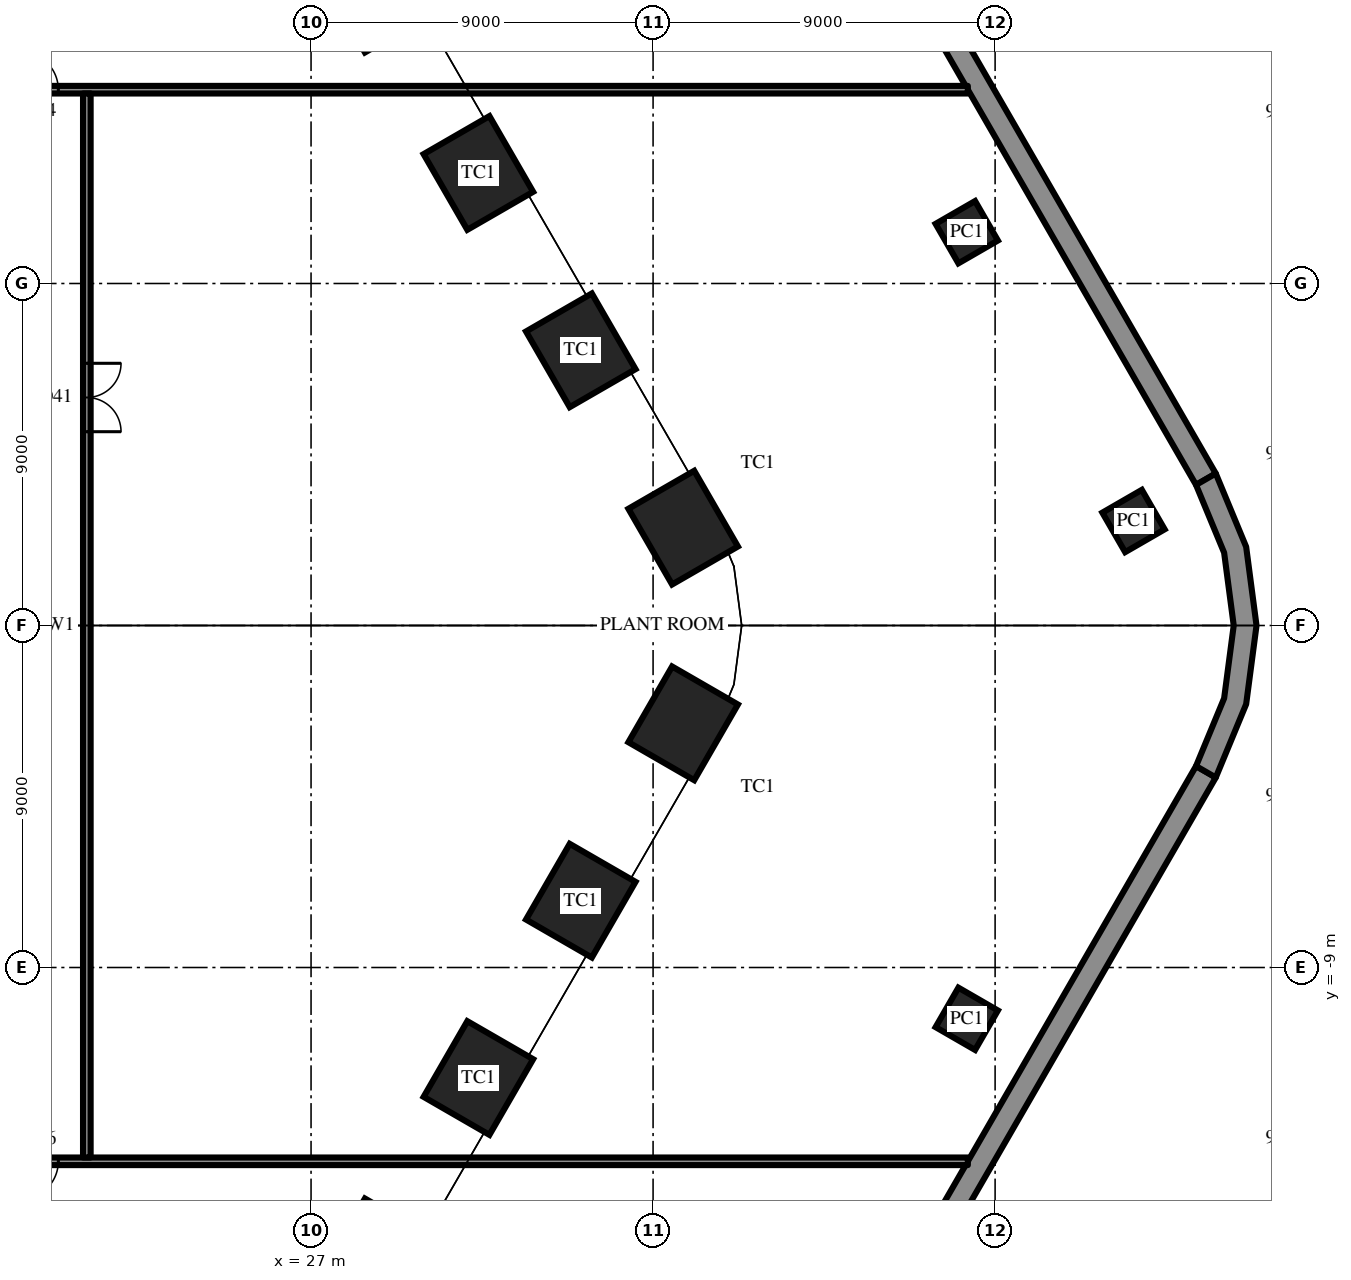
"""IFC4 building model, lengths in metres.
Left out: names, types, materials, properties, quantities, classifications, styles, units other than length and angle.
Written with IfcOpenShell. Run it as: python <this file> out.ifc"""

import sys

from ifc_helpers import new_model, si_unit, direction, frame, frame_2d, origin, origin_2d, place, context, subcontext, project, spatial, polyline, rectangle, outline, extrude, element, fill, save


model = new_model("IFC4")
c1 = context("Model", 3, precision=1e-05, world=origin(), true_north=direction((0.0, 1.0)))
c2 = subcontext(c1, "Body", "Model", "MODEL_VIEW")
j1 = project(units=[si_unit("LENGTHUNIT", "METRE"), si_unit("PLANEANGLEUNIT", "RADIAN")], contexts=[c1])
p1 = place(None, origin())
s1 = spatial("IfcSite", under=j1, at=p1, CompositionType="ELEMENT")
p2 = place(p1, origin())
s2 = spatial("IfcBuilding", under=s1, at=p2, CompositionType="ELEMENT")
p3 = place(p2, frame((0.0, 0.0, -4.5)))
s3 = spatial("IfcBuildingStorey", under=s2, at=p3, CompositionType="ELEMENT", Elevation=-4.5)
for number, where, z_axis, x_axis in (
    (1, (36.792, 2.575, 0.0), (0.0, 0.0, 1.0), (-0.5, 0.866, 0.0)),
    (2, (34.097, 7.242, 0.0), (0.0, 0.0, 1.0), (-0.5, 0.866, 0.0)),
    (3, (31.403, 11.908, 0.0), (0.0, 0.0, 1.0), (-0.5, 0.866, 0.0)),
    (4, (28.709, 16.575, 0.0), (0.0, 0.0, 1.0), (-0.5, 0.866, 0.0)),
    (5, (28.709, -16.575, 0.0), (0.0, 0.0, 1.0), (0.5, 0.866, 0.0)),
    (6, (31.403, -11.908, 0.0), (0.0, 0.0, 1.0), (0.5, 0.866, 0.0)),
    (7, (34.097, -7.242, 0.0), (0.0, 0.0, 1.0), (0.5, 0.866, 0.0)),
    (8, (36.792, -2.575, 0.0), (0.0, 0.0, 1.0), (0.5, 0.866, 0.0)),
):
    element("IfcColumn", number, at=place(p3, frame(where, z_axis=z_axis, x_axis=x_axis)), inside=s3, PredefinedType="COLUMN", context=c2, shape_type="SweptSolid", body=[
        extrude(rectangle(XDim=2.3, YDim=2.0, at=origin_2d()), origin(), (0.0, 0.0, 1.0), 4.5),
    ])
for number, where, z_axis, x_axis in (
    (9, (48.642, 2.75, 0.0), (0.0, 0.0, 1.0), (-0.5, 0.866, 0.0)),
    (10, (44.254, 10.35, 0.0), (0.0, 0.0, 1.0), (-0.5, 0.866, 0.0)),
    (11, (44.254, -10.35, 0.0), (0.0, 0.0, 1.0), (0.5, 0.866, 0.0)),
):
    element("IfcColumn", number, at=place(p3, frame(where, z_axis=z_axis, x_axis=x_axis)), inside=s3, PredefinedType="COLUMN", context=c2, shape_type="SweptSolid", body=[
        extrude(rectangle(XDim=1.2, YDim=1.2, at=origin_2d()), origin(), (0.0, 0.0, 1.0), 4.5),
    ])
for number, where, z_axis, x_axis in (
    (12, (50.547, 3.85, 0.0), (0.0, 0.0, 1.0), (-0.5, 0.866, 0.0)),
    (13, (28.608, -41.85, 0.0), (0.0, 0.0, 1.0), (0.5, 0.866, 0.0)),
):
    element("IfcWall", number, at=place(p3, frame(where, z_axis=z_axis, x_axis=x_axis)), inside=s3, PredefinedType="SOLIDWALL", context=c2, shape_type="SweptSolid", body=[
        extrude(rectangle(XDim=43.879, YDim=0.6, at=frame_2d((21.939, 0.0))), origin(), (0.0, 0.0, 1.0), 4.5),
    ])
p4 = place(p3, origin())
e14 = element("IfcWall", 14, at=p4, inside=s3, PredefinedType="SOLIDWALL", context=c2, shape_type="SweptSolid", body=[
    extrude(outline(polyline([(50.807, -4.0), (51.606, -2.071), (51.879, 0.0), (51.606, 2.071), (50.807, 4.0), (50.287, 3.7), (51.026, 1.915), (51.279, 0.0), (51.026, -1.915), (50.287, -3.7), (50.807, -4.0)])), origin(), (0.0, 0.0, 1.0), 4.5),
])
p5 = place(p3, frame((-44.283, 14.1, 0.0), z_axis=(0.0, 0.0, 1.0), x_axis=(1.0, 0.0, 0.0)))
e15 = element("IfcWall", 15, at=p5, inside=s3, PredefinedType="PARTITIONING", context=c2, shape_type="SweptSolid", body=[
    extrude(rectangle(XDim=88.565, YDim=0.2, at=frame_2d((44.283, 0.0))), origin(), (0.0, 0.0, 1.0), 4.15),
])
p6 = place(p5, frame((38.383, 0.0, 0.0)))
e16 = element("IfcOpeningElement", 16, at=p6, cuts=e15, PredefinedType="OPENING", context=c2, shape_type="SweptSolid", body=[
    extrude(rectangle(XDim=1.8, YDim=2.4, at=frame_2d((0.9, 1.2))), frame((0.0, 0.11, 0.0), z_axis=(0.0, -1.0, 0.0), x_axis=(1.0, 0.0, 0.0)), (0.0, 0.0, 1.0), 0.22),
])
p7 = place(p5, frame((55.783, 0.0, 0.0)))
e17 = element("IfcOpeningElement", 17, at=p7, cuts=e15, PredefinedType="OPENING", context=c2, shape_type="SweptSolid", body=[
    extrude(rectangle(XDim=1.0, YDim=2.2, at=frame_2d((0.5, 1.1))), frame((0.0, 0.11, 0.0), z_axis=(0.0, -1.0, 0.0), x_axis=(1.0, 0.0, 0.0)), (0.0, 0.0, 1.0), 0.22),
])
p8 = place(p5, frame((46.083, 0.0, 0.0)))
e18 = element("IfcOpeningElement", 18, at=p8, cuts=e15, PredefinedType="OPENING", context=c2, shape_type="SweptSolid", body=[
    extrude(rectangle(XDim=1.8, YDim=2.4, at=frame_2d((0.9, 1.2))), frame((0.0, 0.11, 0.0), z_axis=(0.0, -1.0, 0.0), x_axis=(1.0, 0.0, 0.0)), (0.0, 0.0, 1.0), 0.22),
])
p9 = place(p5, frame((63.633, 0.0, 0.0)))
e19 = element("IfcOpeningElement", 19, at=p9, cuts=e15, PredefinedType="OPENING", context=c2, shape_type="SweptSolid", body=[
    extrude(rectangle(XDim=1.0, YDim=2.2, at=frame_2d((0.5, 1.1))), frame((0.0, 0.11, 0.0), z_axis=(0.0, -1.0, 0.0), x_axis=(1.0, 0.0, 0.0)), (0.0, 0.0, 1.0), 0.22),
])
p10 = place(p3, frame((-44.283, -14.1, 0.0), z_axis=(0.0, 0.0, 1.0), x_axis=(1.0, 0.0, 0.0)))
e20 = element("IfcWall", 20, at=p10, inside=s3, PredefinedType="PARTITIONING", context=c2, shape_type="SweptSolid", body=[
    extrude(rectangle(XDim=88.565, YDim=0.2, at=frame_2d((44.283, 0.0))), origin(), (0.0, 0.0, 1.0), 4.15),
])
p11 = place(p10, frame((31.383, 0.0, 0.0)))
e21 = element("IfcOpeningElement", 21, at=p11, cuts=e20, PredefinedType="OPENING", context=c2, shape_type="SweptSolid", body=[
    extrude(rectangle(XDim=1.8, YDim=2.4, at=frame_2d((0.9, 1.2))), frame((0.0, 0.11, 0.0), z_axis=(0.0, -1.0, 0.0), x_axis=(1.0, 0.0, 0.0)), (0.0, 0.0, 1.0), 0.22),
])
p12 = place(p10, frame((50.283, 0.0, 0.0)))
e22 = element("IfcOpeningElement", 22, at=p12, cuts=e20, PredefinedType="OPENING", context=c2, shape_type="SweptSolid", body=[
    extrude(rectangle(XDim=1.0, YDim=2.2, at=frame_2d((0.5, 1.1))), frame((0.0, 0.11, 0.0), z_axis=(0.0, -1.0, 0.0), x_axis=(1.0, 0.0, 0.0)), (0.0, 0.0, 1.0), 0.22),
])
p13 = place(p10, frame((46.083, 0.0, 0.0)))
e23 = element("IfcOpeningElement", 23, at=p13, cuts=e20, PredefinedType="OPENING", context=c2, shape_type="SweptSolid", body=[
    extrude(rectangle(XDim=1.8, YDim=2.4, at=frame_2d((0.9, 1.2))), frame((0.0, 0.11, 0.0), z_axis=(0.0, -1.0, 0.0), x_axis=(1.0, 0.0, 0.0)), (0.0, 0.0, 1.0), 0.22),
])
p14 = place(p10, frame((63.633, 0.0, 0.0)))
e24 = element("IfcOpeningElement", 24, at=p14, cuts=e20, PredefinedType="OPENING", context=c2, shape_type="SweptSolid", body=[
    extrude(rectangle(XDim=1.0, YDim=2.2, at=frame_2d((0.5, 1.1))), frame((0.0, 0.11, 0.0), z_axis=(0.0, -1.0, 0.0), x_axis=(1.0, 0.0, 0.0)), (0.0, 0.0, 1.0), 0.22),
])
p15 = place(p3, frame((21.1, -14.0, 0.0), z_axis=(0.0, 0.0, 1.0), x_axis=(0.0, 1.0, 0.0)))
e25 = element("IfcWall", 25, at=p15, inside=s3, PredefinedType="PARTITIONING", context=c2, shape_type="SweptSolid", body=[
    extrude(rectangle(XDim=28.0, YDim=0.2, at=frame_2d((14.0, 0.0))), origin(), (0.0, 0.0, 1.0), 4.15),
])
p16 = place(p15, frame((19.1, 0.0, 0.0)))
e26 = element("IfcOpeningElement", 26, at=p16, cuts=e25, PredefinedType="OPENING", context=c2, shape_type="SweptSolid", body=[
    extrude(rectangle(XDim=1.8, YDim=2.4, at=frame_2d((0.9, 1.2))), frame((0.0, 0.11, 0.0), z_axis=(0.0, -1.0, 0.0), x_axis=(1.0, 0.0, 0.0)), (0.0, 0.0, 1.0), 0.22),
])
p17 = place(p9, origin())
e27 = element("IfcDoor", 27, at=p17, inside=s3, OperationType="SINGLE_SWING_RIGHT", PredefinedType="DOOR", context=c2, shape_type="SweptSolid", body=[
    extrude(rectangle(XDim=1.0, YDim=2.2, at=frame_2d((0.5, 1.1))), frame((0.0, 0.025, 0.0), z_axis=(0.0, -1.0, 0.0), x_axis=(1.0, 0.0, 0.0)), (0.0, 0.0, 1.0), 0.05),
])
fill(e19, e27)
p18 = place(p14, frame((1.0, 0.0, 0.0), z_axis=(0.0, 0.0, 1.0), x_axis=(-1.0, 0.0, 0.0)))
e28 = element("IfcDoor", 28, at=p18, inside=s3, OperationType="SINGLE_SWING_LEFT", PredefinedType="DOOR", context=c2, shape_type="SweptSolid", body=[
    extrude(rectangle(XDim=1.0, YDim=2.2, at=frame_2d((0.5, 1.1))), frame((0.0, 0.025, 0.0), z_axis=(0.0, -1.0, 0.0), x_axis=(1.0, 0.0, 0.0)), (0.0, 0.0, 1.0), 0.05),
])
fill(e24, e28)
p19 = place(p16, frame((1.8, 0.0, 0.0), z_axis=(0.0, 0.0, 1.0), x_axis=(-1.0, 0.0, 0.0)))
e29 = element("IfcDoor", 29, at=p19, inside=s3, OperationType="DOUBLE_DOOR_SINGLE_SWING", PredefinedType="DOOR", context=c2, shape_type="SweptSolid", body=[
    extrude(rectangle(XDim=1.8, YDim=2.4, at=frame_2d((0.9, 1.2))), frame((0.0, 0.025, 0.0), z_axis=(0.0, -1.0, 0.0), x_axis=(1.0, 0.0, 0.0)), (0.0, 0.0, 1.0), 0.05),
])
fill(e26, e29)
save(model, sys.argv[1])
